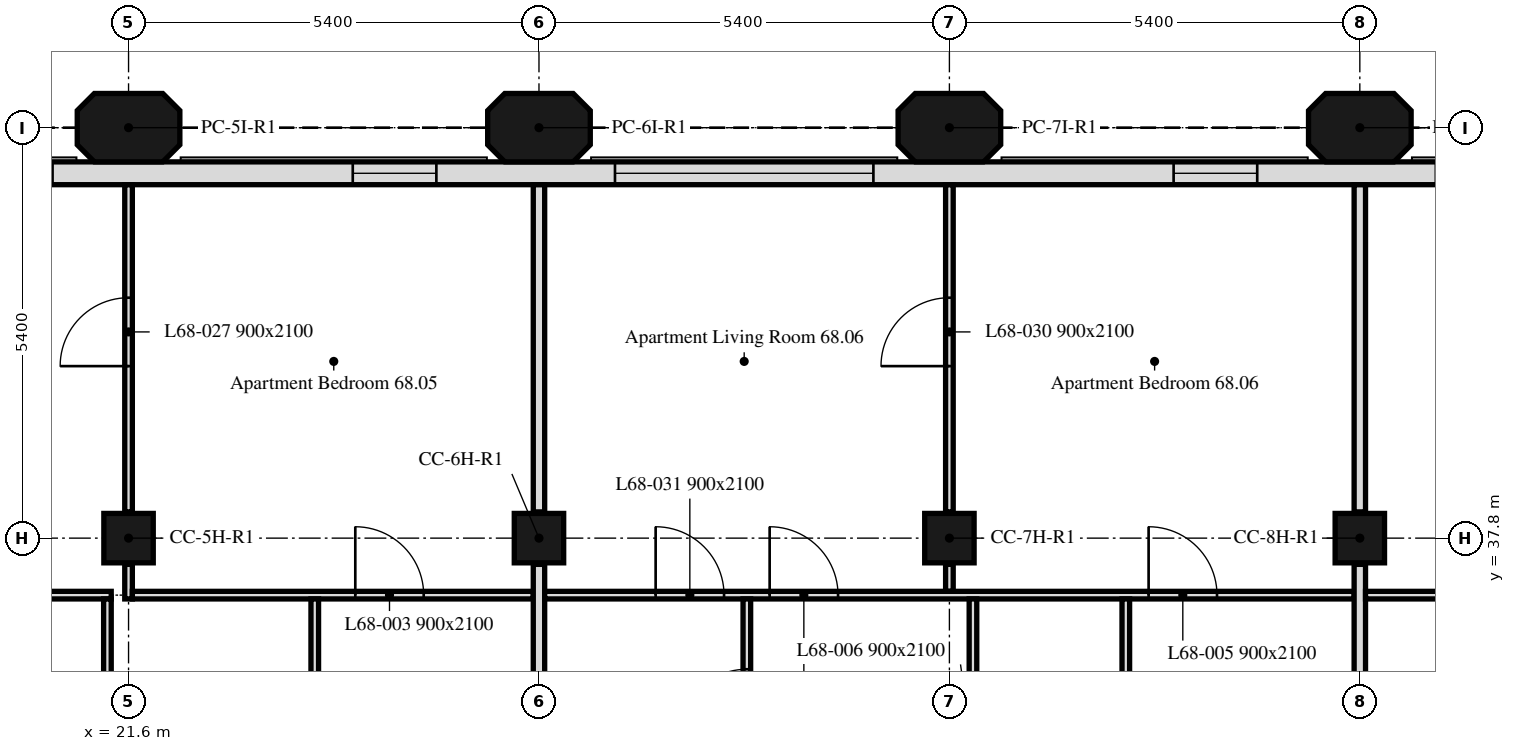
"""IFC4 building model, lengths in metres.
Left out: names, types, materials, properties, quantities, classifications, styles, units other than length and angle.
Written with IfcOpenShell. Run it as: python <this file> out.ifc"""

import sys

from ifc_helpers import new_model, si_unit, direction, frame, frame_2d, origin, origin_2d, place, context, subcontext, project, spatial, polyline, rectangle, outline, extrude, element, fill, save


model = new_model("IFC4")
c1 = context("Model", 3, precision=1e-05, world=origin(), true_north=direction((0.0, 1.0)))
c2 = subcontext(c1, "Body", "Model", "MODEL_VIEW")
j1 = project(units=[si_unit("LENGTHUNIT", "METRE"), si_unit("PLANEANGLEUNIT", "RADIAN")], contexts=[c1])
p1 = place(None, origin())
s1 = spatial("IfcSite", under=j1, at=p1, CompositionType="ELEMENT")
p2 = place(p1, origin())
s2 = spatial("IfcBuilding", under=s1, at=p2, CompositionType="ELEMENT")
p3 = place(p2, frame((0.0, 0.0, 278.5)))
s3 = spatial("IfcBuildingStorey", under=s2, at=p3, CompositionType="ELEMENT", Elevation=278.5)
for number, where, z_axis, x_axis in (
    (1, (21.6, 37.8, 0.0), (0.0, 0.0, 1.0), (1.0, 0.0, 0.0)),
    (2, (27.0, 37.8, 0.0), (0.0, 0.0, 1.0), (1.0, 0.0, 0.0)),
    (3, (32.4, 37.8, 0.0), (0.0, 0.0, 1.0), (1.0, 0.0, 0.0)),
    (4, (37.8, 37.8, 0.0), (0.0, 0.0, 1.0), (1.0, 0.0, 0.0)),
):
    element("IfcColumn", number, at=place(p3, frame(where, z_axis=z_axis, x_axis=x_axis)), inside=s3, PredefinedType="COLUMN", context=c2, shape_type="SweptSolid", body=[
        extrude(rectangle(XDim=0.65, YDim=0.65, at=origin_2d()), origin(), (0.0, 0.0, 1.0), 3.0),
    ])
for number, where, z_axis, x_axis in (
    (5, (21.6, 43.2, 0.0), (0.0, 0.0, 1.0), (1.0, 0.0, 0.0)),
    (6, (27.0, 43.2, 0.0), (0.0, 0.0, 1.0), (1.0, 0.0, 0.0)),
    (7, (32.4, 43.2, 0.0), (0.0, 0.0, 1.0), (1.0, 0.0, 0.0)),
    (8, (37.8, 43.2, 0.0), (0.0, 0.0, 1.0), (1.0, 0.0, 0.0)),
):
    element("IfcColumn", number, at=place(p3, frame(where, z_axis=z_axis, x_axis=x_axis)), inside=s3, PredefinedType="COLUMN", context=c2, shape_type="SweptSolid", body=[
        extrude(outline(polyline([(-0.45, -0.45), (0.45, -0.45), (0.675, -0.225), (0.675, 0.225), (0.45, 0.45), (-0.45, 0.45), (-0.675, 0.225), (-0.675, -0.225), (-0.45, -0.45)])), origin(), (0.0, 0.0, 1.0), 3.0),
    ])
p4 = place(p3, frame((43.014, 42.6, 0.0), z_axis=(0.0, 0.0, 1.0), x_axis=(-1.0, 0.0, 0.0)))
e9 = element("IfcWall", 9, at=p4, inside=s3, PredefinedType="SOLIDWALL", context=c2, shape_type="SweptSolid", body=[
    extrude(rectangle(XDim=32.027, YDim=0.3, at=frame_2d((16.014, 0.0))), origin(), (0.0, 0.0, 1.0), 3.0),
])
p5 = place(p4, frame((0.814, 0.0, 0.9)))
e10 = element("IfcOpeningElement", 10, at=p5, cuts=e9, PredefinedType="OPENING", context=c2, shape_type="SweptSolid", body=[
    extrude(rectangle(XDim=3.4, YDim=1.7, at=frame_2d((1.7, 0.85))), frame((0.0, 0.16, 0.0), z_axis=(0.0, -1.0, 0.0), x_axis=(1.0, 0.0, 0.0)), (0.0, 0.0, 1.0), 0.32),
])
p6 = place(p4, frame((6.564, 0.0, 0.9)))
e11 = element("IfcOpeningElement", 11, at=p6, cuts=e9, PredefinedType="OPENING", context=c2, shape_type="SweptSolid", body=[
    extrude(rectangle(XDim=1.1, YDim=1.7, at=frame_2d((0.55, 0.85))), frame((0.0, 0.16, 0.0), z_axis=(0.0, -1.0, 0.0), x_axis=(1.0, 0.0, 0.0)), (0.0, 0.0, 1.0), 0.32),
])
p7 = place(p4, frame((11.614, 0.0, 0.9)))
e12 = element("IfcOpeningElement", 12, at=p7, cuts=e9, PredefinedType="OPENING", context=c2, shape_type="SweptSolid", body=[
    extrude(rectangle(XDim=3.4, YDim=1.7, at=frame_2d((1.7, 0.85))), frame((0.0, 0.16, 0.0), z_axis=(0.0, -1.0, 0.0), x_axis=(1.0, 0.0, 0.0)), (0.0, 0.0, 1.0), 0.32),
])
p8 = place(p4, frame((17.364, 0.0, 0.9)))
e13 = element("IfcOpeningElement", 13, at=p8, cuts=e9, PredefinedType="OPENING", context=c2, shape_type="SweptSolid", body=[
    extrude(rectangle(XDim=1.1, YDim=1.7, at=frame_2d((0.55, 0.85))), frame((0.0, 0.16, 0.0), z_axis=(0.0, -1.0, 0.0), x_axis=(1.0, 0.0, 0.0)), (0.0, 0.0, 1.0), 0.32),
])
p9 = place(p4, frame((22.414, 0.0, 0.9)))
e14 = element("IfcOpeningElement", 14, at=p9, cuts=e9, PredefinedType="OPENING", context=c2, shape_type="SweptSolid", body=[
    extrude(rectangle(XDim=3.4, YDim=1.7, at=frame_2d((1.7, 0.85))), frame((0.0, 0.16, 0.0), z_axis=(0.0, -1.0, 0.0), x_axis=(1.0, 0.0, 0.0)), (0.0, 0.0, 1.0), 0.32),
])
p10 = place(p4, frame((28.164, 0.0, 0.9)))
e15 = element("IfcOpeningElement", 15, at=p10, cuts=e9, PredefinedType="OPENING", context=c2, shape_type="SweptSolid", body=[
    extrude(rectangle(XDim=1.1, YDim=1.7, at=frame_2d((0.55, 0.85))), frame((0.0, 0.16, 0.0), z_axis=(0.0, -1.0, 0.0), x_axis=(1.0, 0.0, 0.0)), (0.0, 0.0, 1.0), 0.32),
])
p11 = place(p3, frame((16.275, 37.05, 0.0), z_axis=(0.0, 0.0, 1.0), x_axis=(1.0, 0.0, 0.0)))
e16 = element("IfcWall", 16, at=p11, inside=s3, PredefinedType="PARTITIONING", context=c2, shape_type="SweptSolid", body=[
    extrude(rectangle(XDim=5.097, YDim=0.1, at=frame_2d((2.549, 0.0))), origin(), (0.0, 0.0, 1.0), 3.0),
])
p12 = place(p11, frame((0.526, 0.0, 0.0)))
e17 = element("IfcOpeningElement", 17, at=p12, cuts=e16, PredefinedType="OPENING", context=c2, shape_type="SweptSolid", body=[
    extrude(rectangle(XDim=0.9, YDim=2.1, at=frame_2d((0.45, 1.05))), frame((0.0, 0.05, 0.0), z_axis=(0.0, -1.0, 0.0), x_axis=(1.0, 0.0, 0.0)), (0.0, 0.0, 1.0), 0.1),
])
p13 = place(p11, frame((2.14, 0.0, 0.0)))
e18 = element("IfcOpeningElement", 18, at=p13, cuts=e16, PredefinedType="OPENING", context=c2, shape_type="SweptSolid", body=[
    extrude(rectangle(XDim=0.9, YDim=2.1, at=frame_2d((0.45, 1.05))), frame((0.0, 0.05, 0.0), z_axis=(0.0, -1.0, 0.0), x_axis=(1.0, 0.0, 0.0)), (0.0, 0.0, 1.0), 0.1),
])
p14 = place(p3, frame((21.6, 37.0, 0.0), z_axis=(0.0, 0.0, 1.0), x_axis=(0.0, 1.0, 0.0)))
e19 = element("IfcWall", 19, at=p14, inside=s3, PredefinedType="PARTITIONING", context=c2, shape_type="SweptSolid", body=[
    extrude(rectangle(XDim=0.455, YDim=0.1, at=frame_2d((0.228, 0.0))), origin(), (0.0, 0.0, 1.0), 3.0),
])
p15 = place(p3, frame((21.6, 38.145, 0.0), z_axis=(0.0, 0.0, 1.0), x_axis=(0.0, 1.0, 0.0)))
e20 = element("IfcWall", 20, at=p15, inside=s3, PredefinedType="PARTITIONING", context=c2, shape_type="SweptSolid", body=[
    extrude(rectangle(XDim=4.304, YDim=0.1, at=frame_2d((2.152, 0.0))), origin(), (0.0, 0.0, 1.0), 3.0),
])
p16 = place(p15, frame((1.918, 0.0, 0.0)))
e21 = element("IfcOpeningElement", 21, at=p16, cuts=e20, PredefinedType="OPENING", context=c2, shape_type="SweptSolid", body=[
    extrude(rectangle(XDim=0.9, YDim=2.1, at=frame_2d((0.45, 1.05))), frame((0.0, 0.05, 0.0), z_axis=(0.0, -1.0, 0.0), x_axis=(1.0, 0.0, 0.0)), (0.0, 0.0, 1.0), 0.1),
])
p17 = place(p3, frame((21.65, 37.05, 0.0), z_axis=(0.0, 0.0, 1.0), x_axis=(1.0, 0.0, 0.0)))
e22 = element("IfcWall", 22, at=p17, inside=s3, PredefinedType="PARTITIONING", context=c2, shape_type="SweptSolid", body=[
    extrude(rectangle(XDim=5.275, YDim=0.1, at=frame_2d((2.638, 0.0))), origin(), (0.0, 0.0, 1.0), 3.0),
])
p18 = place(p17, frame((2.933, 0.0, 0.0)))
e23 = element("IfcOpeningElement", 23, at=p18, cuts=e22, PredefinedType="OPENING", context=c2, shape_type="SweptSolid", body=[
    extrude(rectangle(XDim=0.9, YDim=2.1, at=frame_2d((0.45, 1.05))), frame((0.0, 0.05, 0.0), z_axis=(0.0, -1.0, 0.0), x_axis=(1.0, 0.0, 0.0)), (0.0, 0.0, 1.0), 0.1),
])
p19 = place(p3, frame((27.0, 38.145, 0.0), z_axis=(0.0, 0.0, 1.0), x_axis=(0.0, 1.0, 0.0)))
e24 = element("IfcWall", 24, at=p19, inside=s3, PredefinedType="PARTITIONING", context=c2, shape_type="SweptSolid", body=[
    extrude(rectangle(XDim=4.304, YDim=0.15, at=frame_2d((2.152, 0.0))), origin(), (0.0, 0.0, 1.0), 3.0),
])
p20 = place(p3, frame((21.322, 34.275, 0.0), z_axis=(0.0, 0.0, 1.0), x_axis=(0.0, 1.0, 0.0)))
e25 = element("IfcWall", 25, at=p20, inside=s3, PredefinedType="PARTITIONING", context=c2, shape_type="SweptSolid", body=[
    extrude(rectangle(XDim=2.725, YDim=0.1, at=frame_2d((1.363, 0.0))), origin(), (0.0, 0.0, 1.0), 3.0),
])
p21 = place(p20, frame((0.394, 0.0, 0.0)))
e26 = element("IfcOpeningElement", 26, at=p21, cuts=e25, PredefinedType="OPENING", context=c2, shape_type="SweptSolid", body=[
    extrude(rectangle(XDim=0.9, YDim=2.1, at=frame_2d((0.45, 1.05))), frame((0.0, 0.05, 0.0), z_axis=(0.0, -1.0, 0.0), x_axis=(1.0, 0.0, 0.0)), (0.0, 0.0, 1.0), 0.1),
])
p22 = place(p3, frame((24.05, 34.275, 0.0), z_axis=(0.0, 0.0, 1.0), x_axis=(0.0, 1.0, 0.0)))
e27 = element("IfcWall", 27, at=p22, inside=s3, PredefinedType="PARTITIONING", context=c2, shape_type="SweptSolid", body=[
    extrude(rectangle(XDim=2.725, YDim=0.1, at=frame_2d((1.363, 0.0))), origin(), (0.0, 0.0, 1.0), 3.0),
])
p23 = place(p3, frame((27.0, 34.275, 0.0), z_axis=(0.0, 0.0, 1.0), x_axis=(0.0, 1.0, 0.0)))
e28 = element("IfcWall", 28, at=p23, inside=s3, PredefinedType="PARTITIONING", context=c2, shape_type="SweptSolid", body=[
    extrude(rectangle(XDim=3.18, YDim=0.15, at=frame_2d((1.59, 0.0))), origin(), (0.0, 0.0, 1.0), 3.0),
])
p24 = place(p3, frame((32.4, 37.1, 0.0), z_axis=(0.0, 0.0, 1.0), x_axis=(0.0, 1.0, 0.0)))
e29 = element("IfcWall", 29, at=p24, inside=s3, PredefinedType="PARTITIONING", context=c2, shape_type="SweptSolid", body=[
    extrude(rectangle(XDim=0.355, YDim=0.1, at=frame_2d((0.177, 0.0))), origin(), (0.0, 0.0, 1.0), 3.0),
])
p25 = place(p3, frame((32.4, 38.145, 0.0), z_axis=(0.0, 0.0, 1.0), x_axis=(0.0, 1.0, 0.0)))
e30 = element("IfcWall", 30, at=p25, inside=s3, PredefinedType="PARTITIONING", context=c2, shape_type="SweptSolid", body=[
    extrude(rectangle(XDim=4.304, YDim=0.1, at=frame_2d((2.152, 0.0))), origin(), (0.0, 0.0, 1.0), 3.0),
])
p26 = place(p25, frame((1.918, 0.0, 0.0)))
e31 = element("IfcOpeningElement", 31, at=p26, cuts=e30, PredefinedType="OPENING", context=c2, shape_type="SweptSolid", body=[
    extrude(rectangle(XDim=0.9, YDim=2.1, at=frame_2d((0.45, 1.05))), frame((0.0, 0.05, 0.0), z_axis=(0.0, -1.0, 0.0), x_axis=(1.0, 0.0, 0.0)), (0.0, 0.0, 1.0), 0.1),
])
p27 = place(p3, frame((27.075, 37.05, 0.0), z_axis=(0.0, 0.0, 1.0), x_axis=(1.0, 0.0, 0.0)))
e32 = element("IfcWall", 32, at=p27, inside=s3, PredefinedType="PARTITIONING", context=c2, shape_type="SweptSolid", body=[
    extrude(rectangle(XDim=10.65, YDim=0.1, at=frame_2d((5.325, 0.0))), origin(), (0.0, 0.0, 1.0), 3.0),
])
p28 = place(p27, frame((7.946, 0.0, 0.0)))
e33 = element("IfcOpeningElement", 33, at=p28, cuts=e32, PredefinedType="OPENING", context=c2, shape_type="SweptSolid", body=[
    extrude(rectangle(XDim=0.9, YDim=2.1, at=frame_2d((0.45, 1.05))), frame((0.0, 0.05, 0.0), z_axis=(0.0, -1.0, 0.0), x_axis=(1.0, 0.0, 0.0)), (0.0, 0.0, 1.0), 0.1),
])
p29 = place(p27, frame((1.46, 0.0, 0.0)))
e34 = element("IfcOpeningElement", 34, at=p29, cuts=e32, PredefinedType="OPENING", context=c2, shape_type="SweptSolid", body=[
    extrude(rectangle(XDim=0.9, YDim=2.1, at=frame_2d((0.45, 1.05))), frame((0.0, 0.05, 0.0), z_axis=(0.0, -1.0, 0.0), x_axis=(1.0, 0.0, 0.0)), (0.0, 0.0, 1.0), 0.1),
])
p30 = place(p27, frame((2.96, 0.0, 0.0)))
e35 = element("IfcOpeningElement", 35, at=p30, cuts=e32, PredefinedType="OPENING", context=c2, shape_type="SweptSolid", body=[
    extrude(rectangle(XDim=0.9, YDim=2.1, at=frame_2d((0.45, 1.05))), frame((0.0, 0.05, 0.0), z_axis=(0.0, -1.0, 0.0), x_axis=(1.0, 0.0, 0.0)), (0.0, 0.0, 1.0), 0.1),
])
p31 = place(p3, frame((37.8, 38.145, 0.0), z_axis=(0.0, 0.0, 1.0), x_axis=(0.0, 1.0, 0.0)))
e36 = element("IfcWall", 36, at=p31, inside=s3, PredefinedType="PARTITIONING", context=c2, shape_type="SweptSolid", body=[
    extrude(rectangle(XDim=4.304, YDim=0.15, at=frame_2d((2.152, 0.0))), origin(), (0.0, 0.0, 1.0), 3.0),
])
p32 = place(p3, frame((29.735, 34.275, 0.0), z_axis=(0.0, 0.0, 1.0), x_axis=(0.0, 1.0, 0.0)))
e37 = element("IfcWall", 37, at=p32, inside=s3, PredefinedType="PARTITIONING", context=c2, shape_type="SweptSolid", body=[
    extrude(rectangle(XDim=2.725, YDim=0.1, at=frame_2d((1.363, 0.0))), origin(), (0.0, 0.0, 1.0), 3.0),
])
p33 = place(p32, frame((0.9, 0.0, 0.0)))
e38 = element("IfcOpeningElement", 38, at=p33, cuts=e37, PredefinedType="OPENING", context=c2, shape_type="SweptSolid", body=[
    extrude(rectangle(XDim=0.9, YDim=2.1, at=frame_2d((0.45, 1.05))), frame((0.0, 0.05, 0.0), z_axis=(0.0, -1.0, 0.0), x_axis=(1.0, 0.0, 0.0)), (0.0, 0.0, 1.0), 0.1),
])
p34 = place(p3, frame((32.71, 34.275, 0.0), z_axis=(0.0, 0.0, 1.0), x_axis=(0.0, 1.0, 0.0)))
e39 = element("IfcWall", 39, at=p34, inside=s3, PredefinedType="PARTITIONING", context=c2, shape_type="SweptSolid", body=[
    extrude(rectangle(XDim=2.725, YDim=0.1, at=frame_2d((1.363, 0.0))), origin(), (0.0, 0.0, 1.0), 3.0),
])
p35 = place(p34, frame((0.25, 0.0, 0.0)))
e40 = element("IfcOpeningElement", 40, at=p35, cuts=e39, PredefinedType="OPENING", context=c2, shape_type="SweptSolid", body=[
    extrude(rectangle(XDim=0.9, YDim=2.1, at=frame_2d((0.45, 1.05))), frame((0.0, 0.05, 0.0), z_axis=(0.0, -1.0, 0.0), x_axis=(1.0, 0.0, 0.0)), (0.0, 0.0, 1.0), 0.1),
])
p36 = place(p3, frame((34.721, 34.275, 0.0), z_axis=(0.0, 0.0, 1.0), x_axis=(0.0, 1.0, 0.0)))
e41 = element("IfcWall", 41, at=p36, inside=s3, PredefinedType="PARTITIONING", context=c2, shape_type="SweptSolid", body=[
    extrude(rectangle(XDim=2.725, YDim=0.1, at=frame_2d((1.363, 0.0))), origin(), (0.0, 0.0, 1.0), 3.0),
])
p37 = place(p3, frame((37.8, 34.275, 0.0), z_axis=(0.0, 0.0, 1.0), x_axis=(0.0, 1.0, 0.0)))
e42 = element("IfcWall", 42, at=p37, inside=s3, PredefinedType="PARTITIONING", context=c2, shape_type="SweptSolid", body=[
    extrude(rectangle(XDim=3.18, YDim=0.15, at=frame_2d((1.59, 0.0))), origin(), (0.0, 0.0, 1.0), 3.0),
])
p38 = place(p3, frame((37.875, 37.05, 0.0), z_axis=(0.0, 0.0, 1.0), x_axis=(1.0, 0.0, 0.0)))
e43 = element("IfcWall", 43, at=p38, inside=s3, PredefinedType="PARTITIONING", context=c2, shape_type="SweptSolid", body=[
    extrude(rectangle(XDim=9.974, YDim=0.1, at=frame_2d((4.987, 0.0))), origin(), (0.0, 0.0, 1.0), 3.0),
])
p39 = place(p38, frame((1.519, 0.0, 0.0)))
e44 = element("IfcOpeningElement", 44, at=p39, cuts=e43, PredefinedType="OPENING", context=c2, shape_type="SweptSolid", body=[
    extrude(rectangle(XDim=0.9, YDim=2.1, at=frame_2d((0.45, 1.05))), frame((0.0, 0.05, 0.0), z_axis=(0.0, -1.0, 0.0), x_axis=(1.0, 0.0, 0.0)), (0.0, 0.0, 1.0), 0.1),
])
p40 = place(p38, frame((3.019, 0.0, 0.0)))
e45 = element("IfcOpeningElement", 45, at=p40, cuts=e43, PredefinedType="OPENING", context=c2, shape_type="SweptSolid", body=[
    extrude(rectangle(XDim=0.9, YDim=2.1, at=frame_2d((0.45, 1.05))), frame((0.0, 0.05, 0.0), z_axis=(0.0, -1.0, 0.0), x_axis=(1.0, 0.0, 0.0)), (0.0, 0.0, 1.0), 0.1),
])
p41 = place(p6, origin())
e46 = element("IfcWindow", 46, at=p41, inside=s3, PartitioningType="SINGLE_PANEL", PredefinedType="WINDOW", context=c2, shape_type="SweptSolid", body=[
    extrude(rectangle(XDim=1.1, YDim=1.7, at=frame_2d((0.55, 0.85))), frame((0.0, 0.03, 0.0), z_axis=(0.0, -1.0, 0.0), x_axis=(1.0, 0.0, 0.0)), (0.0, 0.0, 1.0), 0.06),
])
fill(e11, e46)
p42 = place(p7, origin())
e47 = element("IfcWindow", 47, at=p42, inside=s3, PartitioningType="SINGLE_PANEL", PredefinedType="WINDOW", context=c2, shape_type="SweptSolid", body=[
    extrude(rectangle(XDim=3.4, YDim=1.7, at=frame_2d((1.7, 0.85))), frame((0.0, 0.03, 0.0), z_axis=(0.0, -1.0, 0.0), x_axis=(1.0, 0.0, 0.0)), (0.0, 0.0, 1.0), 0.06),
])
fill(e12, e47)
p43 = place(p8, origin())
e48 = element("IfcWindow", 48, at=p43, inside=s3, PartitioningType="SINGLE_PANEL", PredefinedType="WINDOW", context=c2, shape_type="SweptSolid", body=[
    extrude(rectangle(XDim=1.1, YDim=1.7, at=frame_2d((0.55, 0.85))), frame((0.0, 0.03, 0.0), z_axis=(0.0, -1.0, 0.0), x_axis=(1.0, 0.0, 0.0)), (0.0, 0.0, 1.0), 0.06),
])
fill(e13, e48)
p44 = place(p18, origin())
e49 = element("IfcDoor", 49, at=p44, inside=s3, OperationType="SINGLE_SWING_LEFT", PredefinedType="DOOR", context=c2, shape_type="SweptSolid", body=[
    extrude(rectangle(XDim=0.9, YDim=2.1, at=frame_2d((0.45, 1.05))), frame((0.0, 0.025, 0.0), z_axis=(0.0, -1.0, 0.0), x_axis=(1.0, 0.0, 0.0)), (0.0, 0.0, 1.0), 0.05),
])
fill(e23, e49)
p45 = place(p28, origin())
e50 = element("IfcDoor", 50, at=p45, inside=s3, OperationType="SINGLE_SWING_LEFT", PredefinedType="DOOR", context=c2, shape_type="SweptSolid", body=[
    extrude(rectangle(XDim=0.9, YDim=2.1, at=frame_2d((0.45, 1.05))), frame((0.0, 0.025, 0.0), z_axis=(0.0, -1.0, 0.0), x_axis=(1.0, 0.0, 0.0)), (0.0, 0.0, 1.0), 0.05),
])
fill(e33, e50)
p46 = place(p16, origin())
e51 = element("IfcDoor", 51, at=p46, inside=s3, OperationType="SINGLE_SWING_RIGHT", PredefinedType="DOOR", context=c2, shape_type="SweptSolid", body=[
    extrude(rectangle(XDim=0.9, YDim=2.1, at=frame_2d((0.45, 1.05))), frame((0.0, 0.025, 0.0), z_axis=(0.0, -1.0, 0.0), x_axis=(1.0, 0.0, 0.0)), (0.0, 0.0, 1.0), 0.05),
])
fill(e21, e51)
p47 = place(p26, origin())
e52 = element("IfcDoor", 52, at=p47, inside=s3, OperationType="SINGLE_SWING_LEFT", PredefinedType="DOOR", context=c2, shape_type="SweptSolid", body=[
    extrude(rectangle(XDim=0.9, YDim=2.1, at=frame_2d((0.45, 1.05))), frame((0.0, 0.025, 0.0), z_axis=(0.0, -1.0, 0.0), x_axis=(1.0, 0.0, 0.0)), (0.0, 0.0, 1.0), 0.05),
])
fill(e31, e52)
p48 = place(p29, origin())
e53 = element("IfcDoor", 53, at=p48, inside=s3, OperationType="SINGLE_SWING_RIGHT", PredefinedType="DOOR", context=c2, shape_type="SweptSolid", body=[
    extrude(rectangle(XDim=0.9, YDim=2.1, at=frame_2d((0.45, 1.05))), frame((0.0, 0.025, 0.0), z_axis=(0.0, -1.0, 0.0), x_axis=(1.0, 0.0, 0.0)), (0.0, 0.0, 1.0), 0.05),
])
fill(e34, e53)
p49 = place(p33, origin())
e54 = element("IfcDoor", 54, at=p49, inside=s3, OperationType="SINGLE_SWING_LEFT", PredefinedType="DOOR", context=c2, shape_type="SweptSolid", body=[
    extrude(rectangle(XDim=0.9, YDim=2.1, at=frame_2d((0.45, 1.05))), frame((0.0, 0.025, 0.0), z_axis=(0.0, -1.0, 0.0), x_axis=(1.0, 0.0, 0.0)), (0.0, 0.0, 1.0), 0.05),
])
fill(e38, e54)
p50 = place(p30, origin())
e55 = element("IfcDoor", 55, at=p50, inside=s3, OperationType="SINGLE_SWING_LEFT", PredefinedType="DOOR", context=c2, shape_type="SweptSolid", body=[
    extrude(rectangle(XDim=0.9, YDim=2.1, at=frame_2d((0.45, 1.05))), frame((0.0, 0.025, 0.0), z_axis=(0.0, -1.0, 0.0), x_axis=(1.0, 0.0, 0.0)), (0.0, 0.0, 1.0), 0.05),
])
fill(e35, e55)
save(model, sys.argv[1])
